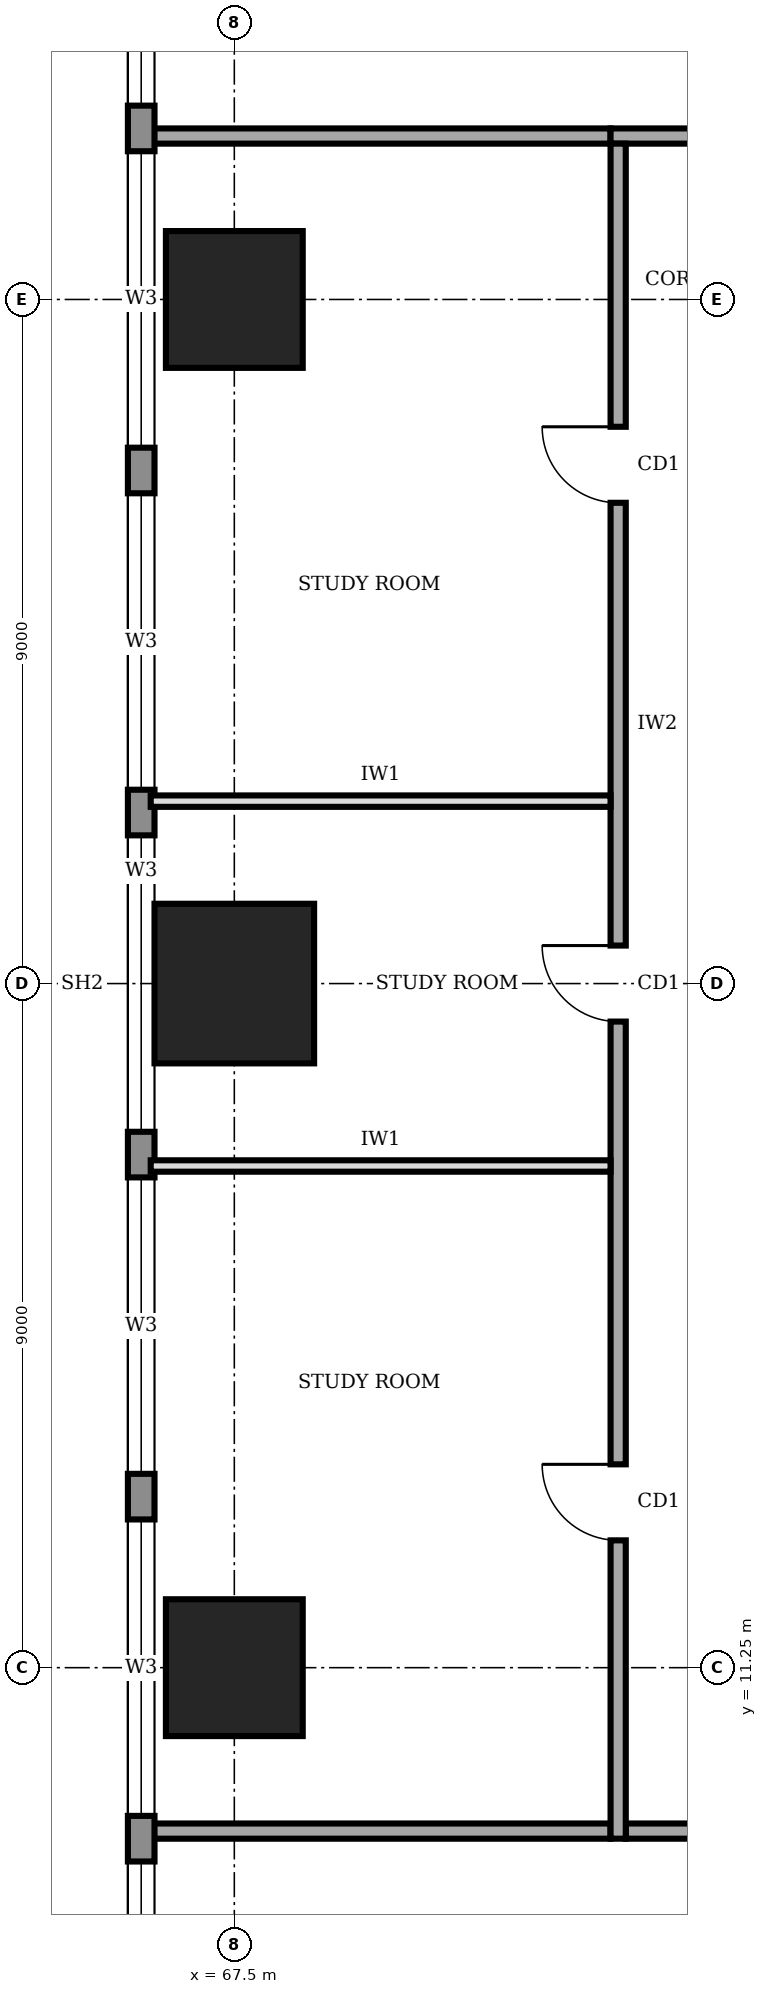
"""IFC4 building model, lengths in metres.
Left out: names, types, materials, properties, quantities, classifications, styles, units other than length and angle.
Written with IfcOpenShell. Run it as: python <this file> out.ifc"""

import sys

from ifc_helpers import new_model, si_unit, direction, frame, frame_2d, origin, origin_2d, place, context, subcontext, project, spatial, rectangle, extrude, element, fill, save


model = new_model("IFC4")
c1 = context("Model", 3, precision=1e-05, world=origin(), true_north=direction((0.0, 1.0)))
c2 = subcontext(c1, "Body", "Model", "MODEL_VIEW")
j1 = project(units=[si_unit("LENGTHUNIT", "METRE"), si_unit("PLANEANGLEUNIT", "RADIAN")], contexts=[c1])
p1 = place(None, origin())
s1 = spatial("IfcSite", under=j1, at=p1, CompositionType="ELEMENT")
p2 = place(p1, origin())
s2 = spatial("IfcBuilding", under=s1, at=p2, CompositionType="ELEMENT")
p3 = place(p2, frame((0.0, 0.0, 201.0)))
s3 = spatial("IfcBuildingStorey", under=s2, at=p3, CompositionType="ELEMENT", Elevation=201.0)
p4 = place(p3, frame((67.5, 11.25, 0.0), z_axis=(0.0, 0.0, 1.0), x_axis=(1.0, 0.0, 0.0)))
e1 = element("IfcColumn", 1, at=p4, inside=s3, PredefinedType="COLUMN", context=c2, shape_type="SweptSolid", body=[
    extrude(rectangle(XDim=1.8, YDim=1.8, at=origin_2d()), origin(), (0.0, 0.0, 1.0), 4.0),
])
p5 = place(p3, frame((67.5, 20.25, 0.0), z_axis=(0.0, 0.0, 1.0), x_axis=(1.0, 0.0, 0.0)))
e2 = element("IfcColumn", 2, at=p5, inside=s3, PredefinedType="COLUMN", context=c2, shape_type="SweptSolid", body=[
    extrude(rectangle(XDim=2.1, YDim=2.1, at=origin_2d()), origin(), (0.0, 0.0, 1.0), 4.0),
])
p6 = place(p3, frame((67.5, 29.25, 0.0), z_axis=(0.0, 0.0, 1.0), x_axis=(1.0, 0.0, 0.0)))
e3 = element("IfcColumn", 3, at=p6, inside=s3, PredefinedType="COLUMN", context=c2, shape_type="SweptSolid", body=[
    extrude(rectangle(XDim=1.8, YDim=1.8, at=origin_2d()), origin(), (0.0, 0.0, 1.0), 4.0),
])
p7 = place(p3, frame((66.275, 37.18, 0.0), z_axis=(0.0, 0.0, 1.0), x_axis=(0.0, -1.0, 0.0)))
e4 = element("IfcWall", 4, at=p7, inside=s3, PredefinedType="STANDARD", context=c2, shape_type="SweptSolid", body=[
    extrude(rectangle(XDim=33.86, YDim=0.35, at=frame_2d((16.93, 0.0))), origin(), (0.0, 0.0, 1.0), 3.75),
])
p8 = place(p7, frame((28.48, 0.0, 0.95)))
e5 = element("IfcOpeningElement", 5, at=p8, cuts=e4, PredefinedType="OPENING", context=c2, shape_type="SweptSolid", body=[
    extrude(rectangle(XDim=3.9, YDim=1.8, at=frame_2d((1.95, 0.9))), frame((0.0, 0.185, 0.0), z_axis=(0.0, -1.0, 0.0), x_axis=(1.0, 0.0, 0.0)), (0.0, 0.0, 1.0), 0.37),
])
p9 = place(p7, frame((23.98, 0.0, 0.95)))
e6 = element("IfcOpeningElement", 6, at=p9, cuts=e4, PredefinedType="OPENING", context=c2, shape_type="SweptSolid", body=[
    extrude(rectangle(XDim=3.9, YDim=1.8, at=frame_2d((1.95, 0.9))), frame((0.0, 0.185, 0.0), z_axis=(0.0, -1.0, 0.0), x_axis=(1.0, 0.0, 0.0)), (0.0, 0.0, 1.0), 0.37),
])
p10 = place(p7, frame((19.48, 0.0, 0.95)))
e7 = element("IfcOpeningElement", 7, at=p10, cuts=e4, PredefinedType="OPENING", context=c2, shape_type="SweptSolid", body=[
    extrude(rectangle(XDim=3.9, YDim=1.8, at=frame_2d((1.95, 0.9))), frame((0.0, 0.185, 0.0), z_axis=(0.0, -1.0, 0.0), x_axis=(1.0, 0.0, 0.0)), (0.0, 0.0, 1.0), 0.37),
])
p11 = place(p7, frame((14.98, 0.0, 0.95)))
e8 = element("IfcOpeningElement", 8, at=p11, cuts=e4, PredefinedType="OPENING", context=c2, shape_type="SweptSolid", body=[
    extrude(rectangle(XDim=3.9, YDim=1.8, at=frame_2d((1.95, 0.9))), frame((0.0, 0.185, 0.0), z_axis=(0.0, -1.0, 0.0), x_axis=(1.0, 0.0, 0.0)), (0.0, 0.0, 1.0), 0.37),
])
p12 = place(p7, frame((10.48, 0.0, 0.95)))
e9 = element("IfcOpeningElement", 9, at=p12, cuts=e4, PredefinedType="OPENING", context=c2, shape_type="SweptSolid", body=[
    extrude(rectangle(XDim=3.9, YDim=1.8, at=frame_2d((1.95, 0.9))), frame((0.0, 0.185, 0.0), z_axis=(0.0, -1.0, 0.0), x_axis=(1.0, 0.0, 0.0)), (0.0, 0.0, 1.0), 0.37),
])
p13 = place(p7, frame((5.98, 0.0, 0.95)))
e10 = element("IfcOpeningElement", 10, at=p13, cuts=e4, PredefinedType="OPENING", context=c2, shape_type="SweptSolid", body=[
    extrude(rectangle(XDim=3.9, YDim=1.8, at=frame_2d((1.95, 0.9))), frame((0.0, 0.185, 0.0), z_axis=(0.0, -1.0, 0.0), x_axis=(1.0, 0.0, 0.0)), (0.0, 0.0, 1.0), 0.37),
])
p14 = place(p7, frame((1.48, 0.0, 0.95)))
e11 = element("IfcOpeningElement", 11, at=p14, cuts=e4, PredefinedType="OPENING", context=c2, shape_type="SweptSolid", body=[
    extrude(rectangle(XDim=3.9, YDim=1.8, at=frame_2d((1.95, 0.9))), frame((0.0, 0.185, 0.0), z_axis=(0.0, -1.0, 0.0), x_axis=(1.0, 0.0, 0.0)), (0.0, 0.0, 1.0), 0.37),
])
p15 = place(p3, frame((72.65, 9.1, 0.0), z_axis=(0.0, 0.0, 1.0), x_axis=(1.0, 0.0, 0.0)))
e12 = element("IfcWall", 12, at=p15, inside=s3, PredefinedType="SOLIDWALL", context=c2, shape_type="SweptSolid", body=[
    extrude(rectangle(XDim=16.9, YDim=0.2, at=frame_2d((8.45, 0.0))), origin(), (0.0, 0.0, 1.0), 3.75),
])
p16 = place(p15, frame((1.325, 0.0, 0.0)))
e13 = element("IfcOpeningElement", 13, at=p16, cuts=e12, PredefinedType="OPENING", context=c2, shape_type="SweptSolid", body=[
    extrude(rectangle(XDim=1.0, YDim=2.1, at=frame_2d((0.5, 1.05))), frame((0.0, 0.11, 0.0), z_axis=(0.0, -1.0, 0.0), x_axis=(1.0, 0.0, 0.0)), (0.0, 0.0, 1.0), 0.22),
])
p17 = place(p3, frame((89.35, 31.4, 0.0), z_axis=(0.0, 0.0, 1.0), x_axis=(-1.0, 0.0, 0.0)))
e14 = element("IfcWall", 14, at=p17, inside=s3, PredefinedType="SOLIDWALL", context=c2, shape_type="SweptSolid", body=[
    extrude(rectangle(XDim=16.9, YDim=0.2, at=frame_2d((8.45, 0.0))), origin(), (0.0, 0.0, 1.0), 3.75),
])
p18 = place(p17, frame((12.125, 0.0, 0.0)))
e15 = element("IfcOpeningElement", 15, at=p18, cuts=e14, PredefinedType="OPENING", context=c2, shape_type="SweptSolid", body=[
    extrude(rectangle(XDim=1.0, YDim=2.1, at=frame_2d((0.5, 1.05))), frame((0.0, 0.11, 0.0), z_axis=(0.0, -1.0, 0.0), x_axis=(1.0, 0.0, 0.0)), (0.0, 0.0, 1.0), 0.22),
])
p19 = place(p17, frame((5.6, 0.0, 0.0)))
e16 = element("IfcOpeningElement", 16, at=p19, cuts=e14, PredefinedType="OPENING", context=c2, shape_type="SweptSolid", body=[
    extrude(rectangle(XDim=1.0, YDim=2.1, at=frame_2d((0.5, 1.05))), frame((0.0, 0.11, 0.0), z_axis=(0.0, -1.0, 0.0), x_axis=(1.0, 0.0, 0.0)), (0.0, 0.0, 1.0), 0.22),
])
p20 = place(p17, frame((1.325, 0.0, 0.0)))
e17 = element("IfcOpeningElement", 17, at=p20, cuts=e14, PredefinedType="OPENING", context=c2, shape_type="SweptSolid", body=[
    extrude(rectangle(XDim=1.0, YDim=2.1, at=frame_2d((0.5, 1.05))), frame((0.0, 0.11, 0.0), z_axis=(0.0, -1.0, 0.0), x_axis=(1.0, 0.0, 0.0)), (0.0, 0.0, 1.0), 0.22),
])
p21 = place(p3, frame((72.55, 31.3, 0.0), z_axis=(0.0, 0.0, 1.0), x_axis=(0.0, -1.0, 0.0)))
e18 = element("IfcWall", 18, at=p21, inside=s3, PredefinedType="SOLIDWALL", context=c2, shape_type="SweptSolid", body=[
    extrude(rectangle(XDim=22.3, YDim=0.2, at=frame_2d((11.15, 0.0))), origin(), (0.0, 0.0, 1.0), 3.75),
])
p22 = place(p21, frame((17.375, 0.0, 0.0)))
e19 = element("IfcOpeningElement", 19, at=p22, cuts=e18, PredefinedType="OPENING", context=c2, shape_type="SweptSolid", body=[
    extrude(rectangle(XDim=1.0, YDim=2.1, at=frame_2d((0.5, 1.05))), frame((0.0, 0.11, 0.0), z_axis=(0.0, -1.0, 0.0), x_axis=(1.0, 0.0, 0.0)), (0.0, 0.0, 1.0), 0.22),
])
p23 = place(p21, frame((10.55, 0.0, 0.0)))
e20 = element("IfcOpeningElement", 20, at=p23, cuts=e18, PredefinedType="OPENING", context=c2, shape_type="SweptSolid", body=[
    extrude(rectangle(XDim=1.0, YDim=2.1, at=frame_2d((0.5, 1.05))), frame((0.0, 0.11, 0.0), z_axis=(0.0, -1.0, 0.0), x_axis=(1.0, 0.0, 0.0)), (0.0, 0.0, 1.0), 0.22),
])
p24 = place(p21, frame((3.725, 0.0, 0.0)))
e21 = element("IfcOpeningElement", 21, at=p24, cuts=e18, PredefinedType="OPENING", context=c2, shape_type="SweptSolid", body=[
    extrude(rectangle(XDim=1.0, YDim=2.1, at=frame_2d((0.5, 1.05))), frame((0.0, 0.11, 0.0), z_axis=(0.0, -1.0, 0.0), x_axis=(1.0, 0.0, 0.0)), (0.0, 0.0, 1.0), 0.22),
])
for number, where, z_axis, x_axis in (
    (22, (66.4, 9.1, 0.0), (0.0, 0.0, 1.0), (1.0, 0.0, 0.0)),
    (23, (66.4, 31.4, 0.0), (0.0, 0.0, 1.0), (1.0, 0.0, 0.0)),
):
    element("IfcWall", number, at=place(p3, frame(where, z_axis=z_axis, x_axis=x_axis)), inside=s3, PredefinedType="SOLIDWALL", context=c2, shape_type="SweptSolid", body=[
        extrude(rectangle(XDim=6.05, YDim=0.2, at=frame_2d((3.025, 0.0))), origin(), (0.0, 0.0, 1.0), 3.75),
    ])
for number, where, z_axis, x_axis in (
    (24, (66.4, 17.85, 0.0), (0.0, 0.0, 1.0), (1.0, 0.0, 0.0)),
    (25, (66.4, 22.65, 0.0), (0.0, 0.0, 1.0), (1.0, 0.0, 0.0)),
):
    element("IfcWall", number, at=place(p3, frame(where, z_axis=z_axis, x_axis=x_axis)), inside=s3, PredefinedType="PARTITIONING", context=c2, shape_type="SweptSolid", body=[
        extrude(rectangle(XDim=6.05, YDim=0.15, at=frame_2d((3.025, 0.0))), origin(), (0.0, 0.0, 1.0), 3.75),
    ])
p25 = place(p8, origin())
e26 = element("IfcWindow", 26, at=p25, inside=s3, PartitioningType="SINGLE_PANEL", PredefinedType="WINDOW", context=c2, shape_type="SweptSolid", body=[
    extrude(rectangle(XDim=3.9, YDim=1.8, at=frame_2d((1.95, 0.9))), frame((0.0, 0.03, 0.0), z_axis=(0.0, -1.0, 0.0), x_axis=(1.0, 0.0, 0.0)), (0.0, 0.0, 1.0), 0.06),
])
fill(e5, e26)
p26 = place(p9, origin())
e27 = element("IfcWindow", 27, at=p26, inside=s3, PartitioningType="SINGLE_PANEL", PredefinedType="WINDOW", context=c2, shape_type="SweptSolid", body=[
    extrude(rectangle(XDim=3.9, YDim=1.8, at=frame_2d((1.95, 0.9))), frame((0.0, 0.03, 0.0), z_axis=(0.0, -1.0, 0.0), x_axis=(1.0, 0.0, 0.0)), (0.0, 0.0, 1.0), 0.06),
])
fill(e6, e27)
p27 = place(p10, origin())
e28 = element("IfcWindow", 28, at=p27, inside=s3, PartitioningType="SINGLE_PANEL", PredefinedType="WINDOW", context=c2, shape_type="SweptSolid", body=[
    extrude(rectangle(XDim=3.9, YDim=1.8, at=frame_2d((1.95, 0.9))), frame((0.0, 0.03, 0.0), z_axis=(0.0, -1.0, 0.0), x_axis=(1.0, 0.0, 0.0)), (0.0, 0.0, 1.0), 0.06),
])
fill(e7, e28)
p28 = place(p11, origin())
e29 = element("IfcWindow", 29, at=p28, inside=s3, PartitioningType="SINGLE_PANEL", PredefinedType="WINDOW", context=c2, shape_type="SweptSolid", body=[
    extrude(rectangle(XDim=3.9, YDim=1.8, at=frame_2d((1.95, 0.9))), frame((0.0, 0.03, 0.0), z_axis=(0.0, -1.0, 0.0), x_axis=(1.0, 0.0, 0.0)), (0.0, 0.0, 1.0), 0.06),
])
fill(e8, e29)
p29 = place(p12, origin())
e30 = element("IfcWindow", 30, at=p29, inside=s3, PartitioningType="SINGLE_PANEL", PredefinedType="WINDOW", context=c2, shape_type="SweptSolid", body=[
    extrude(rectangle(XDim=3.9, YDim=1.8, at=frame_2d((1.95, 0.9))), frame((0.0, 0.03, 0.0), z_axis=(0.0, -1.0, 0.0), x_axis=(1.0, 0.0, 0.0)), (0.0, 0.0, 1.0), 0.06),
])
fill(e9, e30)
p30 = place(p13, origin())
e31 = element("IfcWindow", 31, at=p30, inside=s3, PartitioningType="SINGLE_PANEL", PredefinedType="WINDOW", context=c2, shape_type="SweptSolid", body=[
    extrude(rectangle(XDim=3.9, YDim=1.8, at=frame_2d((1.95, 0.9))), frame((0.0, 0.03, 0.0), z_axis=(0.0, -1.0, 0.0), x_axis=(1.0, 0.0, 0.0)), (0.0, 0.0, 1.0), 0.06),
])
fill(e10, e31)
p31 = place(p14, origin())
e32 = element("IfcWindow", 32, at=p31, inside=s3, PartitioningType="SINGLE_PANEL", PredefinedType="WINDOW", context=c2, shape_type="SweptSolid", body=[
    extrude(rectangle(XDim=3.9, YDim=1.8, at=frame_2d((1.95, 0.9))), frame((0.0, 0.03, 0.0), z_axis=(0.0, -1.0, 0.0), x_axis=(1.0, 0.0, 0.0)), (0.0, 0.0, 1.0), 0.06),
])
fill(e11, e32)
p32 = place(p22, frame((1.0, 0.0, 0.0), z_axis=(0.0, 0.0, 1.0), x_axis=(-1.0, 0.0, 0.0)))
e33 = element("IfcDoor", 33, at=p32, inside=s3, OperationType="SINGLE_SWING_RIGHT", PredefinedType="DOOR", context=c2, shape_type="SweptSolid", body=[
    extrude(rectangle(XDim=1.0, YDim=2.1, at=frame_2d((0.5, 1.05))), frame((0.0, 0.025, 0.0), z_axis=(0.0, -1.0, 0.0), x_axis=(1.0, 0.0, 0.0)), (0.0, 0.0, 1.0), 0.05),
])
fill(e19, e33)
p33 = place(p23, frame((1.0, 0.0, 0.0), z_axis=(0.0, 0.0, 1.0), x_axis=(-1.0, 0.0, 0.0)))
e34 = element("IfcDoor", 34, at=p33, inside=s3, OperationType="SINGLE_SWING_RIGHT", PredefinedType="DOOR", context=c2, shape_type="SweptSolid", body=[
    extrude(rectangle(XDim=1.0, YDim=2.1, at=frame_2d((0.5, 1.05))), frame((0.0, 0.025, 0.0), z_axis=(0.0, -1.0, 0.0), x_axis=(1.0, 0.0, 0.0)), (0.0, 0.0, 1.0), 0.05),
])
fill(e20, e34)
p34 = place(p24, frame((1.0, 0.0, 0.0), z_axis=(0.0, 0.0, 1.0), x_axis=(-1.0, 0.0, 0.0)))
e35 = element("IfcDoor", 35, at=p34, inside=s3, OperationType="SINGLE_SWING_RIGHT", PredefinedType="DOOR", context=c2, shape_type="SweptSolid", body=[
    extrude(rectangle(XDim=1.0, YDim=2.1, at=frame_2d((0.5, 1.05))), frame((0.0, 0.025, 0.0), z_axis=(0.0, -1.0, 0.0), x_axis=(1.0, 0.0, 0.0)), (0.0, 0.0, 1.0), 0.05),
])
fill(e21, e35)
save(model, sys.argv[1])
